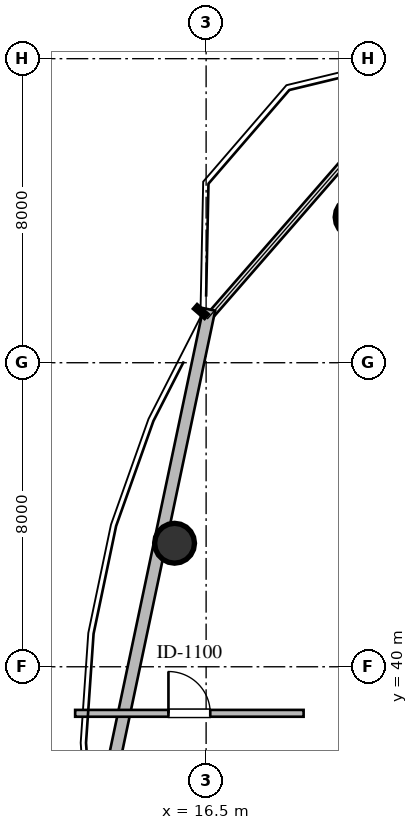
"""IFC4 building model, lengths in metres.
Left out: names, types, materials, properties, quantities, classifications, styles, units other than length and angle.
Written with IfcOpenShell. Run it as: python <this file> out.ifc"""

import sys

from ifc_helpers import new_model, si_unit, direction, frame, frame_2d, origin, origin_2d, place, context, subcontext, project, spatial, rectangle, circle, extrude, element, fill, save


model = new_model("IFC4")
c1 = context("Model", 3, precision=1e-05, world=origin(), true_north=direction((0.0, 1.0)))
c2 = subcontext(c1, "Body", "Model", "MODEL_VIEW")
j1 = project(units=[si_unit("LENGTHUNIT", "METRE"), si_unit("PLANEANGLEUNIT", "RADIAN")], contexts=[c1])
p1 = place(None, origin())
s1 = spatial("IfcSite", under=j1, at=p1, CompositionType="ELEMENT")
p2 = place(p1, origin())
s2 = spatial("IfcBuilding", under=s1, at=p2, CompositionType="ELEMENT")
p3 = place(p2, frame((0.0, 0.0, 246.0)))
s3 = spatial("IfcBuildingStorey", under=s2, at=p3, CompositionType="ELEMENT", Elevation=246.0)
for number, where, z_axis, x_axis in (
    (1, (20.42, 51.83, 0.0), (0.0, 0.0, 1.0), (1.0, 0.0, 0.0)),
    (2, (15.67, 43.25, 0.0), (0.0, 0.0, 1.0), (1.0, 0.0, 0.0)),
):
    element("IfcColumn", number, at=place(p3, frame(where, z_axis=z_axis, x_axis=x_axis)), inside=s3, PredefinedType="COLUMN", context=c2, shape_type="SweptSolid", body=[
        extrude(circle(Radius=0.525, at=origin_2d()), origin(), (0.0, 0.0, 1.0), 3.6),
    ])
p4 = place(p3, frame((13.525, 34.903, 0.0), z_axis=(0.0, 0.0, 1.0), x_axis=(0.206301080321, 0.978488561128, 0.0)))
e3 = element("IfcWall", 3, at=p4, inside=s3, PredefinedType="STANDARD", context=c2, shape_type="SweptSolid", body=[
    extrude(rectangle(XDim=14.819, YDim=0.32, at=frame_2d((7.409, 0.0))), origin(), (0.0, 0.0, 1.0), 2.817),
])
p5 = place(p3, frame((13.054, 38.775, 0.0), z_axis=(0.0, 0.0, 1.0), x_axis=(1.0, 0.0, 0.0)))
e4 = element("IfcWall", 4, at=p5, inside=s3, PredefinedType="PARTITIONING", context=c2, shape_type="SweptSolid", body=[
    extrude(rectangle(XDim=6.011, YDim=0.18, at=frame_2d((3.005, 0.0))), origin(), (0.0, 0.0, 1.0), 3.36),
])
p6 = place(p5, frame((2.455, 0.0, 0.0)))
e5 = element("IfcOpeningElement", 5, at=p6, cuts=e4, PredefinedType="OPENING", context=c2, shape_type="SweptSolid", body=[
    extrude(rectangle(XDim=1.1, YDim=2.1, at=frame_2d((0.55, 1.05))), frame((0.0, 0.1, 0.0), z_axis=(0.0, -1.0, 0.0), x_axis=(1.0, 0.0, 0.0)), (0.0, 0.0, 1.0), 0.2),
])
p7 = place(p6, origin())
e6 = element("IfcDoor", 6, at=p7, inside=s3, OperationType="SINGLE_SWING_LEFT", PredefinedType="DOOR", context=c2, shape_type="SweptSolid", body=[
    extrude(rectangle(XDim=1.1, YDim=2.1, at=frame_2d((0.55, 1.05))), frame((0.0, 0.025, 0.0), z_axis=(0.0, -1.0, 0.0), x_axis=(1.0, 0.0, 0.0)), (0.0, 0.0, 1.0), 0.05),
])
fill(e5, e6)
save(model, sys.argv[1])
